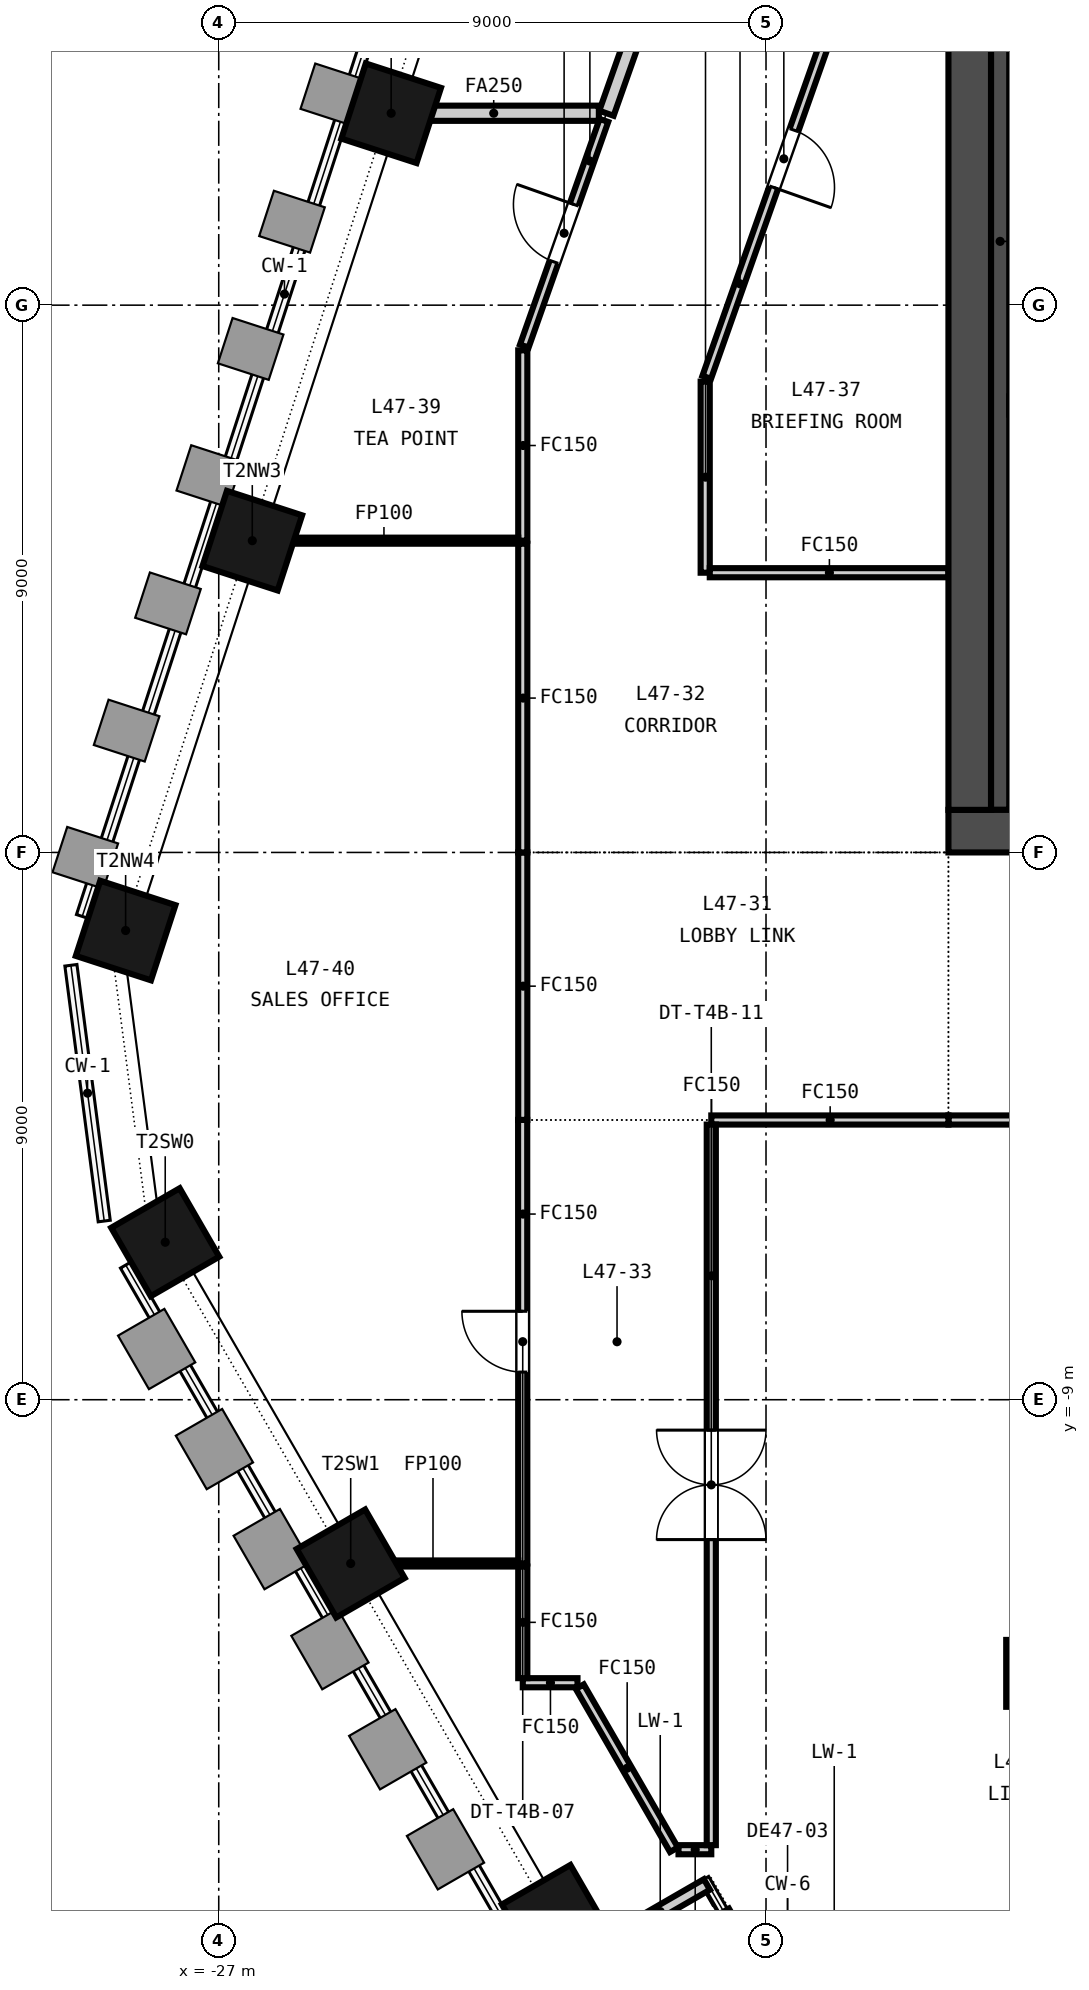
"""IFC4 building model, lengths in metres.
Left out: names, types, materials, properties, quantities, classifications, styles, units other than length and angle.
Written with IfcOpenShell. Run it as: python <this file> out.ifc"""

import sys

from ifc_helpers import new_model, si_unit, direction, frame, frame_2d, origin, origin_2d, place, context, subcontext, project, spatial, rectangle, extrude, element, fill, save


model = new_model("IFC4")
c1 = context("Model", 3, precision=1e-05, world=origin(), true_north=direction((0.0, 1.0)))
c2 = subcontext(c1, "Body", "Model", "MODEL_VIEW")
j1 = project(units=[si_unit("LENGTHUNIT", "METRE"), si_unit("PLANEANGLEUNIT", "RADIAN")], contexts=[c1])
p1 = place(None, origin())
s1 = spatial("IfcSite", under=j1, at=p1, CompositionType="ELEMENT")
p2 = place(p1, origin())
s2 = spatial("IfcBuilding", under=s1, at=p2, CompositionType="ELEMENT")
p3 = place(p2, frame((0.0, 0.0, 189.05)))
s3 = spatial("IfcBuildingStorey", under=s2, at=p3, CompositionType="ELEMENT", Elevation=189.05)
p4 = place(p3, frame((-15.0, 0.35, -0.15), z_axis=(0.0, 0.0, 1.0), x_axis=(1.0, 0.0, 0.0)))
e1 = element("IfcWall", 1, at=p4, inside=s3, PredefinedType="SOLIDWALL", context=c2, shape_type="SweptSolid", body=[
    extrude(rectangle(XDim=30.0, YDim=0.7, at=frame_2d((15.0, 0.0))), origin(), (0.0, 0.0, 1.0), 3.65),
])
p5 = place(p4, frame((5.8, 0.0, 0.15)))
e2 = element("IfcOpeningElement", 2, at=p5, cuts=e1, PredefinedType="OPENING", context=c2, shape_type="SweptSolid", body=[
    extrude(rectangle(XDim=2.4, YDim=2.4, at=frame_2d((1.2, 1.2))), frame((0.0, 0.36, 0.0), z_axis=(0.0, -1.0, 0.0), x_axis=(1.0, 0.0, 0.0)), (0.0, 0.0, 1.0), 0.72),
])
p6 = place(p4, frame((13.8, 0.0, 0.15)))
e3 = element("IfcOpeningElement", 3, at=p6, cuts=e1, PredefinedType="OPENING", context=c2, shape_type="SweptSolid", body=[
    extrude(rectangle(XDim=2.4, YDim=2.4, at=frame_2d((1.2, 1.2))), frame((0.0, 0.36, 0.0), z_axis=(0.0, -1.0, 0.0), x_axis=(1.0, 0.0, 0.0)), (0.0, 0.0, 1.0), 0.72),
])
p7 = place(p4, frame((21.8, 0.0, 0.15)))
e4 = element("IfcOpeningElement", 4, at=p7, cuts=e1, PredefinedType="OPENING", context=c2, shape_type="SweptSolid", body=[
    extrude(rectangle(XDim=2.4, YDim=2.4, at=frame_2d((1.2, 1.2))), frame((0.0, 0.36, 0.0), z_axis=(0.0, -1.0, 0.0), x_axis=(1.0, 0.0, 0.0)), (0.0, 0.0, 1.0), 0.72),
])
p8 = place(p4, frame((1.5, 0.0, 0.15)))
e5 = element("IfcOpeningElement", 5, at=p8, cuts=e1, PredefinedType="OPENING", context=c2, shape_type="SweptSolid", body=[
    extrude(rectangle(XDim=1.2, YDim=2.1, at=frame_2d((0.6, 1.05))), frame((0.0, 0.36, 0.0), z_axis=(0.0, -1.0, 0.0), x_axis=(1.0, 0.0, 0.0)), (0.0, 0.0, 1.0), 0.72),
])
p9 = place(p4, frame((27.3, 0.0, 0.15)))
e6 = element("IfcOpeningElement", 6, at=p9, cuts=e1, PredefinedType="OPENING", context=c2, shape_type="SweptSolid", body=[
    extrude(rectangle(XDim=1.2, YDim=2.1, at=frame_2d((0.6, 1.05))), frame((0.0, 0.36, 0.0), z_axis=(0.0, -1.0, 0.0), x_axis=(1.0, 0.0, 0.0)), (0.0, 0.0, 1.0), 0.72),
])
p10 = place(p3, frame((-14.65, 0.7, -0.15), z_axis=(0.0, 0.0, 1.0), x_axis=(0.0, 1.0, 0.0)))
e7 = element("IfcWall", 7, at=p10, inside=s3, PredefinedType="SOLIDWALL", context=c2, shape_type="SweptSolid", body=[
    extrude(rectangle(XDim=13.6, YDim=0.7, at=frame_2d((6.8, 0.0))), origin(), (0.0, 0.0, 1.0), 3.65),
])
for number, where, z_axis, x_axis in (
    (8, (-24.164, 12.156, -0.15), (0.0, 0.0, 1.0), (-0.309, -0.951, 0.0)),
    (9, (-26.448, 5.127, -0.15), (0.0, 0.0, 1.0), (-0.309, -0.951, 0.0)),
    (10, (-28.531, -1.284, -0.15), (0.0, 0.0, 1.0), (-0.309, -0.951, 0.0)),
    (11, (-27.88, -6.41, -0.15), (0.0, 0.0, 1.0), (0.5, -0.866, 0.0)),
    (12, (-24.83, -11.693, -0.15), (0.0, 0.0, 1.0), (0.5, -0.866, 0.0)),
    (13, (-21.455, -17.539, -0.15), (0.0, 0.0, 1.0), (0.5, -0.866, 0.0)),
):
    element("IfcColumn", number, at=place(p3, frame(where, z_axis=z_axis, x_axis=x_axis)), inside=s3, PredefinedType="COLUMN", context=c2, shape_type="SweptSolid", body=[
        extrude(rectangle(XDim=1.3, YDim=1.3, at=origin_2d()), origin(), (0.0, 0.0, 1.0), 3.65),
    ])
p11 = place(p3, frame((-13.5, -13.5, -0.15), z_axis=(0.0, 0.0, 1.0), x_axis=(1.0, 0.0, 0.0)))
e14 = element("IfcColumn", 14, at=p11, inside=s3, PredefinedType="COLUMN", context=c2, shape_type="SweptSolid", body=[
    extrude(rectangle(XDim=1.1, YDim=1.1, at=origin_2d()), origin(), (0.0, 0.0, 1.0), 3.65),
])
p12 = place(p3, frame((-18.696, -17.418, 0.0), z_axis=(0.0, 0.0, 1.0), x_axis=(0.49998411664, -0.866034573852, 0.0)))
e15 = element("IfcWall", 15, at=p12, inside=s3, PredefinedType="SOLIDWALL", context=c2, shape_type="SweptSolid", body=[
    extrude(rectangle(XDim=4.2, YDim=0.2, at=frame_2d((2.1, 0.0))), origin(), (0.0, 0.0, 1.0), 3.05),
])
p13 = place(p12, frame((1.2, 0.0, 0.0)))
e16 = element("IfcOpeningElement", 16, at=p13, cuts=e15, PredefinedType="OPENING", context=c2, shape_type="SweptSolid", body=[
    extrude(rectangle(XDim=1.8, YDim=2.4, at=frame_2d((0.9, 1.2))), frame((0.0, 0.11, 0.0), z_axis=(0.0, -1.0, 0.0), x_axis=(1.0, 0.0, 0.0)), (0.0, 0.0, 1.0), 0.22),
])
p14 = place(p3, frame((-20.517, -17.864, 0.0), z_axis=(0.0, 0.0, 1.0), x_axis=(0.866028357664, 0.499994883695, 0.0)))
e17 = element("IfcWall", 17, at=p14, inside=s3, PredefinedType="SOLIDWALL", context=c2, shape_type="SweptSolid", body=[
    extrude(rectangle(XDim=1.784, YDim=0.2, at=frame_2d((0.892, 0.0))), origin(), (0.0, 0.0, 1.0), 3.05),
])
p15 = place(p3, frame((-14.15, 0.7, 0.0), z_axis=(0.0, 0.0, 1.0), x_axis=(0.0, 1.0, 0.0)))
e18 = element("IfcWall", 18, at=p15, inside=s3, PredefinedType="SOLIDWALL", context=c2, shape_type="SweptSolid", body=[
    extrude(rectangle(XDim=13.6, YDim=0.3, at=frame_2d((6.8, 0.0))), origin(), (0.0, 0.0, 1.0), 3.5),
])
p16 = place(p3, frame((0.095, -4.4, 0.0), z_axis=(0.0, 0.0, 1.0), x_axis=(-1.0, 0.0, 0.0)))
e19 = element("IfcWall", 19, at=p16, inside=s3, PredefinedType="PARTITIONING", context=c2, shape_type="SweptSolid", body=[
    extrude(rectangle(XDim=15.095, YDim=0.15, at=frame_2d((7.547, 0.0))), origin(), (0.0, 0.0, 1.0), 2.741),
])
p17 = place(p16, frame((6.647, 0.0, 0.0)))
e20 = element("IfcOpeningElement", 20, at=p17, cuts=e19, PredefinedType="OPENING", context=c2, shape_type="SweptSolid", body=[
    extrude(rectangle(XDim=1.8, YDim=2.1, at=frame_2d((0.9, 1.05))), frame((0.0, 0.085, 0.0), z_axis=(0.0, -1.0, 0.0), x_axis=(1.0, 0.0, 0.0)), (0.0, 0.0, 1.0), 0.17),
])
p18 = place(p3, frame((-15.0, -4.4, 0.0), z_axis=(0.0, 0.0, 1.0), x_axis=(-1.0, 0.0, 0.0)))
e21 = element("IfcWall", 21, at=p18, inside=s3, PredefinedType="PARTITIONING", context=c2, shape_type="SweptSolid", body=[
    extrude(rectangle(XDim=3.9, YDim=0.15, at=frame_2d((1.95, 0.0))), origin(), (0.0, 0.0, 1.0), 2.741),
])
p19 = place(p3, frame((-19.0, 7.743, 0.0), z_axis=(0.0, 0.0, 1.0), x_axis=(0.0, -1.0, 0.0)))
e22 = element("IfcWall", 22, at=p19, inside=s3, PredefinedType="PARTITIONING", context=c2, shape_type="SweptSolid", body=[
    extrude(rectangle(XDim=3.143, YDim=0.15, at=frame_2d((1.571, 0.0))), origin(), (0.0, 0.0, 1.0), 2.741),
])
p20 = place(p3, frame((-16.439, 15.0, 0.0), z_axis=(0.0, 0.0, 1.0), x_axis=(-0.332796656951, -0.942998613531, 0.0)))
e23 = element("IfcWall", 23, at=p20, inside=s3, PredefinedType="PARTITIONING", context=c2, shape_type="SweptSolid", body=[
    extrude(rectangle(XDim=7.621, YDim=0.15, at=frame_2d((3.81, 0.0))), origin(), (0.0, 0.0, 1.0), 2.741),
])
p21 = place(p20, frame((3.31, 0.0, 0.0)))
e24 = element("IfcOpeningElement", 24, at=p21, cuts=e23, PredefinedType="OPENING", context=c2, shape_type="SweptSolid", body=[
    extrude(rectangle(XDim=1.0, YDim=2.1, at=frame_2d((0.5, 1.05))), frame((0.0, 0.085, 0.0), z_axis=(0.0, -1.0, 0.0), x_axis=(1.0, 0.0, 0.0)), (0.0, 0.0, 1.0), 0.17),
])
p22 = place(p3, frame((-22.0, -11.693, 0.0), z_axis=(0.0, 0.0, 1.0), x_axis=(-0.000267728647, 0.999999964161, 0.0)))
e25 = element("IfcWall", 25, at=p22, inside=s3, PredefinedType="PARTITIONING", context=c2, shape_type="SweptSolid", body=[
    extrude(rectangle(XDim=7.295, YDim=0.15, at=frame_2d((3.647, 0.0))), origin(), (0.0, 0.0, 1.0), 2.741),
])
p23 = place(p22, frame((3.147, 0.0, 0.0)))
e26 = element("IfcOpeningElement", 26, at=p23, cuts=e25, PredefinedType="OPENING", context=c2, shape_type="SweptSolid", body=[
    extrude(rectangle(XDim=1.0, YDim=2.1, at=frame_2d((0.5, 1.05))), frame((0.0, 0.085, 0.0), z_axis=(0.0, -1.0, 0.0), x_axis=(1.0, 0.0, 0.0)), (0.0, 0.0, 1.0), 0.17),
])
p24 = place(p3, frame((-21.1, -13.654, 0.0), z_axis=(0.0, 0.0, 1.0), x_axis=(-1.0, 0.0, 0.0)))
e27 = element("IfcWall", 27, at=p24, inside=s3, PredefinedType="PARTITIONING", context=c2, shape_type="SweptSolid", body=[
    extrude(rectangle(XDim=0.9, YDim=0.15, at=frame_2d((0.45, 0.0))), origin(), (0.0, 0.0, 1.0), 2.741),
])
p25 = place(p3, frame((-19.514, -16.4, 0.0), z_axis=(0.0, 0.0, 1.0), x_axis=(-0.500184316454, 0.865918962475, 0.0)))
e28 = element("IfcWall", 28, at=p25, inside=s3, PredefinedType="PARTITIONING", context=c2, shape_type="SweptSolid", body=[
    extrude(rectangle(XDim=3.096, YDim=0.15, at=frame_2d((1.548, 0.0))), origin(), (0.0, 0.0, 1.0), 2.741),
])
p26 = place(p3, frame((-18.9, -16.4, 0.0), z_axis=(0.0, 0.0, 1.0), x_axis=(-1.0, 0.0, 0.0)))
e29 = element("IfcWall", 29, at=p26, inside=s3, PredefinedType="PARTITIONING", context=c2, shape_type="SweptSolid", body=[
    extrude(rectangle(XDim=0.539, YDim=0.15, at=frame_2d((0.27, 0.0))), origin(), (0.0, 0.0, 1.0), 2.741),
])
p27 = place(p3, frame((-18.9, -4.475, 0.0), z_axis=(0.0, 0.0, 1.0), x_axis=(0.0, -1.0, 0.0)))
e30 = element("IfcWall", 30, at=p27, inside=s3, PredefinedType="PARTITIONING", context=c2, shape_type="SweptSolid", body=[
    extrude(rectangle(XDim=11.85, YDim=0.15, at=frame_2d((5.925, 0.0))), origin(), (0.0, 0.0, 1.0), 2.741),
])
p28 = place(p27, frame((5.025, 0.0, 0.0)))
e31 = element("IfcOpeningElement", 31, at=p28, cuts=e30, PredefinedType="OPENING", context=c2, shape_type="SweptSolid", body=[
    extrude(rectangle(XDim=1.8, YDim=2.1, at=frame_2d((0.9, 1.05))), frame((0.0, 0.085, 0.0), z_axis=(0.0, -1.0, 0.0), x_axis=(1.0, 0.0, 0.0)), (0.0, 0.0, 1.0), 0.17),
])
p29 = place(p3, frame((-20.624, 12.156, 0.0), z_axis=(0.0, 0.0, 1.0), x_axis=(0.332877813913, 0.942969968241, 0.0)))
e32 = element("IfcWall", 32, at=p29, inside=s3, PredefinedType="PARTITIONING", context=c2, shape_type="SweptSolid", body=[
    extrude(rectangle(XDim=6.198, YDim=0.25, at=frame_2d((3.099, 0.0))), origin(), (0.0, 0.0, 1.0), 2.741),
])
p30 = place(p3, frame((-24.217, 12.156, 0.0), z_axis=(0.0, 0.0, 1.0), x_axis=(1.0, 0.0, 0.0)))
e33 = element("IfcWall", 33, at=p30, inside=s3, PredefinedType="PARTITIONING", context=c2, shape_type="SweptSolid", body=[
    extrude(rectangle(XDim=3.468, YDim=0.25, at=frame_2d((1.734, 0.0))), origin(), (0.0, 0.0, 1.0), 2.741),
])
p31 = place(p3, frame((-18.925, 4.6, 0.0), z_axis=(0.0, 0.0, 1.0), x_axis=(1.0, 0.0, 0.0)))
e34 = element("IfcWall", 34, at=p31, inside=s3, PredefinedType="PARTITIONING", context=c2, shape_type="SweptSolid", body=[
    extrude(rectangle(XDim=3.925, YDim=0.15, at=frame_2d((1.962, 0.0))), origin(), (0.0, 0.0, 1.0), 2.741),
])
p32 = place(p3, frame((-22.0, 5.127, 0.0), z_axis=(0.0, 0.0, 1.0), x_axis=(0.0, 1.0, 0.0)))
e35 = element("IfcWall", 35, at=p32, inside=s3, PredefinedType="PARTITIONING", context=c2, shape_type="SweptSolid", body=[
    extrude(rectangle(XDim=3.13, YDim=0.15, at=frame_2d((1.565, 0.0))), origin(), (0.0, 0.0, 1.0), 2.741),
])
p33 = place(p3, frame((-21.975, 8.328, 0.0), z_axis=(0.0, 0.0, 1.0), x_axis=(0.332820117735, 0.942990333583, 0.0)))
e36 = element("IfcWall", 36, at=p33, inside=s3, PredefinedType="PARTITIONING", context=c2, shape_type="SweptSolid", body=[
    extrude(rectangle(XDim=3.935, YDim=0.15, at=frame_2d((1.967, 0.0))), origin(), (0.0, 0.0, 1.0), 2.741),
])
p34 = place(p33, frame((1.467, 0.0, 0.0)))
e37 = element("IfcOpeningElement", 37, at=p34, cuts=e36, PredefinedType="OPENING", context=c2, shape_type="SweptSolid", body=[
    extrude(rectangle(XDim=1.0, YDim=2.1, at=frame_2d((0.5, 1.05))), frame((0.0, 0.085, 0.0), z_axis=(0.0, -1.0, 0.0), x_axis=(1.0, 0.0, 0.0)), (0.0, 0.0, 1.0), 0.17),
])
p35 = place(p3, frame((-26.501, 5.127, 0.0), z_axis=(0.0, 0.0, 1.0), x_axis=(1.0, 0.0, 0.0)))
e38 = element("IfcWall", 38, at=p35, inside=s3, PredefinedType="PARTITIONING", context=c2, shape_type="SweptSolid", body=[
    extrude(rectangle(XDim=4.426, YDim=0.1, at=frame_2d((2.213, 0.0))), origin(), (0.0, 0.0, 1.0), 2.741),
])
p36 = place(p3, frame((-22.0, -4.398, 0.0), z_axis=(0.0, 0.0, 1.0), x_axis=(0.0, 1.0, 0.0)))
e39 = element("IfcWall", 39, at=p36, inside=s3, PredefinedType="PARTITIONING", context=c2, shape_type="SweptSolid", body=[
    extrude(rectangle(XDim=4.398, YDim=0.15, at=frame_2d((2.199, 0.0))), origin(), (0.0, 0.0, 1.0), 2.741),
])
p37 = place(p3, frame((-22.0, 0.0, 0.0), z_axis=(0.0, 0.0, 1.0), x_axis=(0.0, 1.0, 0.0)))
e40 = element("IfcWall", 40, at=p37, inside=s3, PredefinedType="PARTITIONING", context=c2, shape_type="SweptSolid", body=[
    extrude(rectangle(XDim=5.077, YDim=0.15, at=frame_2d((2.539, 0.0))), origin(), (0.0, 0.0, 1.0), 2.741),
])
p38 = place(p3, frame((-24.888, -11.693, 0.0), z_axis=(0.0, 0.0, 1.0), x_axis=(1.0, 0.0, 0.0)))
e41 = element("IfcWall", 41, at=p38, inside=s3, PredefinedType="PARTITIONING", context=c2, shape_type="SweptSolid", body=[
    extrude(rectangle(XDim=2.813, YDim=0.1, at=frame_2d((1.406, 0.0))), origin(), (0.0, 0.0, 1.0), 2.741),
])
p39 = place(p3, frame((-22.0, -13.579, 0.0), z_axis=(0.0, 0.0, 1.0), x_axis=(0.0, 1.0, 0.0)))
e42 = element("IfcWall", 42, at=p39, inside=s3, PredefinedType="PARTITIONING", context=c2, shape_type="SweptSolid", body=[
    extrude(rectangle(XDim=1.836, YDim=0.15, at=frame_2d((0.918, 0.0))), origin(), (0.0, 0.0, 1.0), 2.741),
])
p40 = place(p21, origin())
e43 = element("IfcDoor", 43, at=p40, inside=s3, OperationType="SINGLE_SWING_RIGHT", PredefinedType="DOOR", context=c2, shape_type="SweptSolid", body=[
    extrude(rectangle(XDim=1.0, YDim=2.1, at=frame_2d((0.5, 1.05))), frame((0.0, 0.025, 0.0), z_axis=(0.0, -1.0, 0.0), x_axis=(1.0, 0.0, 0.0)), (0.0, 0.0, 1.0), 0.05),
])
fill(e24, e43)
p41 = place(p34, origin())
e44 = element("IfcDoor", 44, at=p41, inside=s3, OperationType="SINGLE_SWING_RIGHT", PredefinedType="DOOR", context=c2, shape_type="SweptSolid", body=[
    extrude(rectangle(XDim=1.0, YDim=2.1, at=frame_2d((0.5, 1.05))), frame((0.0, 0.025, 0.0), z_axis=(0.0, -1.0, 0.0), x_axis=(1.0, 0.0, 0.0)), (0.0, 0.0, 1.0), 0.05),
])
fill(e37, e44)
p42 = place(p23, origin())
e45 = element("IfcDoor", 45, at=p42, inside=s3, OperationType="SINGLE_SWING_RIGHT", PredefinedType="DOOR", context=c2, shape_type="SweptSolid", body=[
    extrude(rectangle(XDim=1.0, YDim=2.1, at=frame_2d((0.5, 1.05))), frame((0.0, 0.025, 0.0), z_axis=(0.0, -1.0, 0.0), x_axis=(1.0, 0.0, 0.0)), (0.0, 0.0, 1.0), 0.05),
])
fill(e26, e45)
p43 = place(p28, origin())
e46 = element("IfcDoor", 46, at=p43, inside=s3, OperationType="DOUBLE_DOOR_DOUBLE_SWING", PredefinedType="DOOR", context=c2, shape_type="SweptSolid", body=[
    extrude(rectangle(XDim=1.8, YDim=2.1, at=frame_2d((0.9, 1.05))), frame((0.0, 0.025, 0.0), z_axis=(0.0, -1.0, 0.0), x_axis=(1.0, 0.0, 0.0)), (0.0, 0.0, 1.0), 0.05),
])
fill(e31, e46)
save(model, sys.argv[1])
